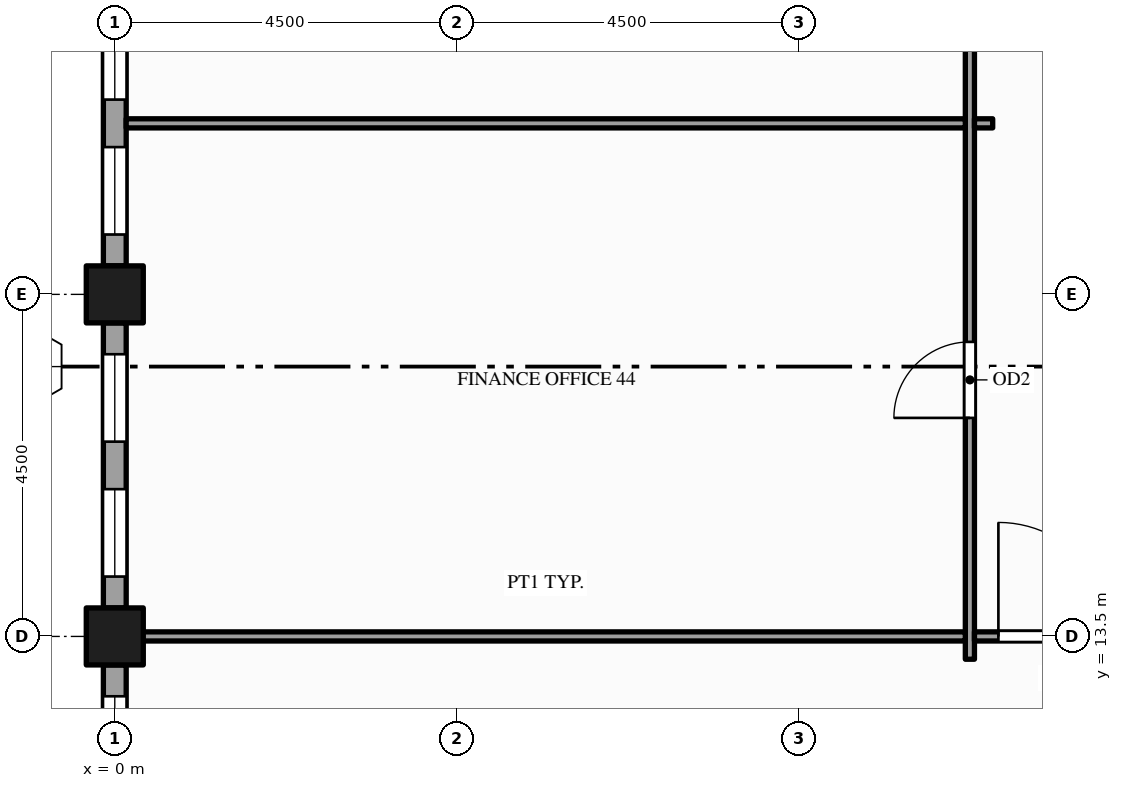
"""IFC4 building model, lengths in metres.
Left out: names, types, materials, properties, quantities, classifications, styles, units other than length and angle.
Written with IfcOpenShell. Run it as: python <this file> out.ifc"""

import sys

from ifc_helpers import new_model, si_unit, direction, frame, frame_2d, origin, origin_2d, place, context, subcontext, project, spatial, rectangle, hollow_rectangle, extrude, element, fill, save


model = new_model("IFC4")
c1 = context("Model", 3, precision=1e-05, world=origin(), true_north=direction((0.0, 1.0)))
c2 = subcontext(c1, "Body", "Model", "MODEL_VIEW")
j1 = project(units=[si_unit("LENGTHUNIT", "METRE"), si_unit("PLANEANGLEUNIT", "RADIAN")], contexts=[c1])
p1 = place(None, origin())
s1 = spatial("IfcSite", under=j1, at=p1, CompositionType="ELEMENT")
p2 = place(p1, origin())
s2 = spatial("IfcBuilding", under=s1, at=p2, CompositionType="ELEMENT")
p3 = place(p2, frame((0.0, 0.0, 211.0)))
s3 = spatial("IfcBuildingStorey", under=s2, at=p3, CompositionType="ELEMENT", Elevation=211.0)
for number, where, z_axis, x_axis in (
    (1, (0.0, 13.5, -0.15), (0.0, 0.0, 1.0), (1.0, 0.0, 0.0)),
    (2, (0.0, 18.0, -0.15), (0.0, 0.0, 1.0), (1.0, 0.0, 0.0)),
):
    element("IfcColumn", number, at=place(p3, frame(where, z_axis=z_axis, x_axis=x_axis)), inside=s3, PredefinedType="COLUMN", context=c2, shape_type="SweptSolid", body=[
        extrude(hollow_rectangle(XDim=0.75, YDim=0.75, WallThickness=0.036, at=origin_2d()), origin(), (0.0, 0.0, 1.0), 4.0),
    ])
p4 = place(p3, frame((0.0, 22.125, 0.0), z_axis=(0.0, 0.0, 1.0), x_axis=(0.0, -1.0, 0.0)))
e3 = element("IfcWall", 3, at=p4, inside=s3, PredefinedType="STANDARD", context=c2, shape_type="SweptSolid", body=[
    extrude(rectangle(XDim=3.75, YDim=0.3, at=frame_2d((1.875, 0.0))), origin(), (0.0, 0.0, 1.0), 3.157),
])
p5 = place(p4, frame((0.413, 0.0, 0.9)))
e4 = element("IfcOpeningElement", 4, at=p5, cuts=e3, PredefinedType="OPENING", context=c2, shape_type="SweptSolid", body=[
    extrude(rectangle(XDim=1.15, YDim=2.0, at=frame_2d((0.575, 1.0))), frame((0.0, 0.16, 0.0), z_axis=(0.0, -1.0, 0.0), x_axis=(1.0, 0.0, 0.0)), (0.0, 0.0, 1.0), 0.32),
])
p6 = place(p4, frame((2.188, 0.0, 0.9)))
e5 = element("IfcOpeningElement", 5, at=p6, cuts=e3, PredefinedType="OPENING", context=c2, shape_type="SweptSolid", body=[
    extrude(rectangle(XDim=1.15, YDim=2.0, at=frame_2d((0.575, 1.0))), frame((0.0, 0.16, 0.0), z_axis=(0.0, -1.0, 0.0), x_axis=(1.0, 0.0, 0.0)), (0.0, 0.0, 1.0), 0.32),
])
p7 = place(p3, frame((0.0, 17.625, 0.0), z_axis=(0.0, 0.0, 1.0), x_axis=(0.0, -1.0, 0.0)))
e6 = element("IfcWall", 6, at=p7, inside=s3, PredefinedType="STANDARD", context=c2, shape_type="SweptSolid", body=[
    extrude(rectangle(XDim=3.75, YDim=0.3, at=frame_2d((1.875, 0.0))), origin(), (0.0, 0.0, 1.0), 3.157),
])
p8 = place(p7, frame((0.413, 0.0, 0.9)))
e7 = element("IfcOpeningElement", 7, at=p8, cuts=e6, PredefinedType="OPENING", context=c2, shape_type="SweptSolid", body=[
    extrude(rectangle(XDim=1.15, YDim=2.0, at=frame_2d((0.575, 1.0))), frame((0.0, 0.16, 0.0), z_axis=(0.0, -1.0, 0.0), x_axis=(1.0, 0.0, 0.0)), (0.0, 0.0, 1.0), 0.32),
])
p9 = place(p7, frame((2.188, 0.0, 0.9)))
e8 = element("IfcOpeningElement", 8, at=p9, cuts=e6, PredefinedType="OPENING", context=c2, shape_type="SweptSolid", body=[
    extrude(rectangle(XDim=1.15, YDim=2.0, at=frame_2d((0.575, 1.0))), frame((0.0, 0.16, 0.0), z_axis=(0.0, -1.0, 0.0), x_axis=(1.0, 0.0, 0.0)), (0.0, 0.0, 1.0), 0.32),
])
p10 = place(p3, frame((0.0, 13.125, 0.0), z_axis=(0.0, 0.0, 1.0), x_axis=(0.0, -1.0, 0.0)))
e9 = element("IfcWall", 9, at=p10, inside=s3, PredefinedType="STANDARD", context=c2, shape_type="SweptSolid", body=[
    extrude(rectangle(XDim=3.75, YDim=0.3, at=frame_2d((1.875, 0.0))), origin(), (0.0, 0.0, 1.0), 3.157),
])
p11 = place(p10, frame((0.413, 0.0, 0.9)))
e10 = element("IfcOpeningElement", 10, at=p11, cuts=e9, PredefinedType="OPENING", context=c2, shape_type="SweptSolid", body=[
    extrude(rectangle(XDim=1.15, YDim=2.0, at=frame_2d((0.575, 1.0))), frame((0.0, 0.16, 0.0), z_axis=(0.0, -1.0, 0.0), x_axis=(1.0, 0.0, 0.0)), (0.0, 0.0, 1.0), 0.32),
])
p12 = place(p10, frame((2.188, 0.0, 0.9)))
e11 = element("IfcOpeningElement", 11, at=p12, cuts=e9, PredefinedType="OPENING", context=c2, shape_type="SweptSolid", body=[
    extrude(rectangle(XDim=1.15, YDim=2.0, at=frame_2d((0.575, 1.0))), frame((0.0, 0.16, 0.0), z_axis=(0.0, -1.0, 0.0), x_axis=(1.0, 0.0, 0.0)), (0.0, 0.0, 1.0), 0.32),
])
p13 = place(p3, frame((11.25, 13.2, 0.0), z_axis=(0.0, 0.0, 1.0), x_axis=(0.0, 1.0, 0.0)))
e12 = element("IfcWall", 12, at=p13, inside=s3, PredefinedType="PARTITIONING", context=c2, shape_type="SweptSolid", body=[
    extrude(rectangle(XDim=18.6, YDim=0.12, at=frame_2d((9.3, 0.0))), origin(), (0.0, 0.0, 1.0), 2.6),
])
p14 = place(p13, frame((3.175, 0.0, 0.0)))
e13 = element("IfcOpeningElement", 13, at=p14, cuts=e12, PredefinedType="OPENING", context=c2, shape_type="SweptSolid", body=[
    extrude(rectangle(XDim=1.0, YDim=2.1, at=frame_2d((0.5, 1.05))), frame((0.0, 0.07, 0.0), z_axis=(0.0, -1.0, 0.0), x_axis=(1.0, 0.0, 0.0)), (0.0, 0.0, 1.0), 0.14),
])
p15 = place(p13, frame((9.955, 0.0, 0.0)))
e14 = element("IfcOpeningElement", 14, at=p15, cuts=e12, PredefinedType="OPENING", context=c2, shape_type="SweptSolid", body=[
    extrude(rectangle(XDim=1.0, YDim=2.1, at=frame_2d((0.5, 1.05))), frame((0.0, 0.07, 0.0), z_axis=(0.0, -1.0, 0.0), x_axis=(1.0, 0.0, 0.0)), (0.0, 0.0, 1.0), 0.14),
])
p16 = place(p3, frame((0.15, 13.5, 0.0), z_axis=(0.0, 0.0, 1.0), x_axis=(1.0, 0.0, 0.0)))
e15 = element("IfcWall", 15, at=p16, inside=s3, PredefinedType="PARTITIONING", context=c2, shape_type="SweptSolid", body=[
    extrude(rectangle(XDim=11.04, YDim=0.12, at=frame_2d((5.52, 0.0))), origin(), (0.0, 0.0, 1.0), 2.87),
])
p17 = place(p3, frame((11.31, 13.5, 0.0), z_axis=(0.0, 0.0, 1.0), x_axis=(1.0, 0.0, 0.0)))
e16 = element("IfcWall", 16, at=p17, inside=s3, PredefinedType="PARTITIONING", context=c2, shape_type="SweptSolid", body=[
    extrude(rectangle(XDim=2.13, YDim=0.12, at=frame_2d((1.065, 0.0))), origin(), (0.0, 0.0, 1.0), 2.87),
])
p18 = place(p17, frame((0.315, 0.0, 0.0)))
e17 = element("IfcOpeningElement", 17, at=p18, cuts=e16, PredefinedType="OPENING", context=c2, shape_type="SweptSolid", body=[
    extrude(rectangle(XDim=1.5, YDim=2.1, at=frame_2d((0.75, 1.05))), frame((0.0, 0.07, 0.0), z_axis=(0.0, -1.0, 0.0), x_axis=(1.0, 0.0, 0.0)), (0.0, 0.0, 1.0), 0.14),
])
p19 = place(p3, frame((0.15, 20.25, 0.0), z_axis=(0.0, 0.0, 1.0), x_axis=(1.0, 0.0, 0.0)))
e18 = element("IfcWall", 18, at=p19, inside=s3, PredefinedType="PARTITIONING", context=c2, shape_type="SweptSolid", body=[
    extrude(rectangle(XDim=11.04, YDim=0.12, at=frame_2d((5.52, 0.0))), origin(), (0.0, 0.0, 1.0), 2.87),
])
p20 = place(p3, frame((11.31, 20.25, 0.0), z_axis=(0.0, 0.0, 1.0), x_axis=(1.0, 0.0, 0.0)))
e19 = element("IfcWall", 19, at=p20, inside=s3, PredefinedType="PARTITIONING", context=c2, shape_type="SweptSolid", body=[
    extrude(rectangle(XDim=0.24, YDim=0.12, at=frame_2d((0.12, 0.0))), origin(), (0.0, 0.0, 1.0), 2.87),
])
p21 = place(p5, origin())
e20 = element("IfcWindow", 20, at=p21, inside=s3, PartitioningType="SINGLE_PANEL", PredefinedType="WINDOW", context=c2, shape_type="SweptSolid", body=[
    extrude(rectangle(XDim=1.15, YDim=2.0, at=frame_2d((0.575, 1.0))), frame((0.0, 0.03, 0.0), z_axis=(0.0, -1.0, 0.0), x_axis=(1.0, 0.0, 0.0)), (0.0, 0.0, 1.0), 0.06),
])
fill(e4, e20)
p22 = place(p6, origin())
e21 = element("IfcWindow", 21, at=p22, inside=s3, PartitioningType="SINGLE_PANEL", PredefinedType="WINDOW", context=c2, shape_type="SweptSolid", body=[
    extrude(rectangle(XDim=1.15, YDim=2.0, at=frame_2d((0.575, 1.0))), frame((0.0, 0.03, 0.0), z_axis=(0.0, -1.0, 0.0), x_axis=(1.0, 0.0, 0.0)), (0.0, 0.0, 1.0), 0.06),
])
fill(e5, e21)
p23 = place(p8, origin())
e22 = element("IfcWindow", 22, at=p23, inside=s3, PartitioningType="SINGLE_PANEL", PredefinedType="WINDOW", context=c2, shape_type="SweptSolid", body=[
    extrude(rectangle(XDim=1.15, YDim=2.0, at=frame_2d((0.575, 1.0))), frame((0.0, 0.03, 0.0), z_axis=(0.0, -1.0, 0.0), x_axis=(1.0, 0.0, 0.0)), (0.0, 0.0, 1.0), 0.06),
])
fill(e7, e22)
p24 = place(p9, origin())
e23 = element("IfcWindow", 23, at=p24, inside=s3, PartitioningType="SINGLE_PANEL", PredefinedType="WINDOW", context=c2, shape_type="SweptSolid", body=[
    extrude(rectangle(XDim=1.15, YDim=2.0, at=frame_2d((0.575, 1.0))), frame((0.0, 0.03, 0.0), z_axis=(0.0, -1.0, 0.0), x_axis=(1.0, 0.0, 0.0)), (0.0, 0.0, 1.0), 0.06),
])
fill(e8, e23)
p25 = place(p11, origin())
e24 = element("IfcWindow", 24, at=p25, inside=s3, PartitioningType="SINGLE_PANEL", PredefinedType="WINDOW", context=c2, shape_type="SweptSolid", body=[
    extrude(rectangle(XDim=1.15, YDim=2.0, at=frame_2d((0.575, 1.0))), frame((0.0, 0.03, 0.0), z_axis=(0.0, -1.0, 0.0), x_axis=(1.0, 0.0, 0.0)), (0.0, 0.0, 1.0), 0.06),
])
fill(e10, e24)
p26 = place(p18, origin())
e25 = element("IfcDoor", 25, at=p26, inside=s3, OperationType="SINGLE_SWING_LEFT", PredefinedType="DOOR", context=c2, shape_type="SweptSolid", body=[
    extrude(rectangle(XDim=1.5, YDim=2.1, at=frame_2d((0.75, 1.05))), frame((0.0, 0.025, 0.0), z_axis=(0.0, -1.0, 0.0), x_axis=(1.0, 0.0, 0.0)), (0.0, 0.0, 1.0), 0.05),
])
fill(e17, e25)
p27 = place(p14, origin())
e26 = element("IfcDoor", 26, at=p27, inside=s3, OperationType="SINGLE_SWING_LEFT", PredefinedType="DOOR", context=c2, shape_type="SweptSolid", body=[
    extrude(rectangle(XDim=1.0, YDim=2.1, at=frame_2d((0.5, 1.05))), frame((0.0, 0.025, 0.0), z_axis=(0.0, -1.0, 0.0), x_axis=(1.0, 0.0, 0.0)), (0.0, 0.0, 1.0), 0.05),
])
fill(e13, e26)
save(model, sys.argv[1])
